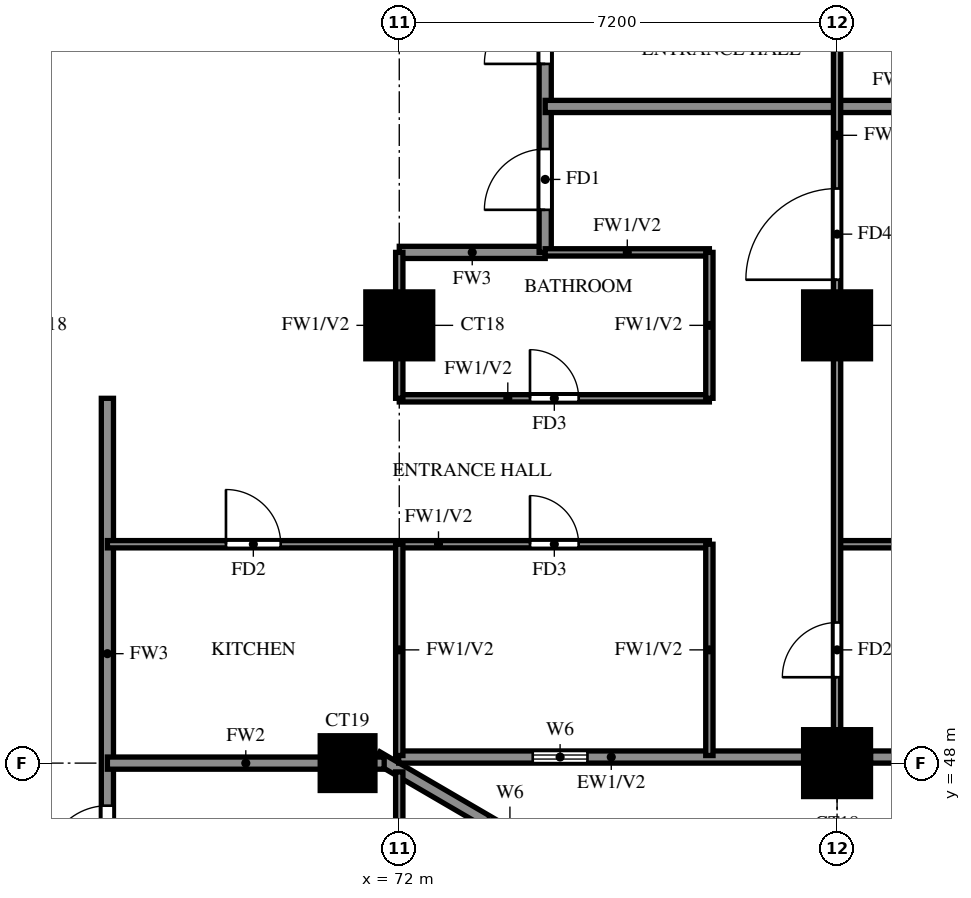
"""IFC4 building model, lengths in metres.
Left out: names, types, materials, properties, quantities, classifications, styles, units other than length and angle.
Written with IfcOpenShell. Run it as: python <this file> out.ifc"""

import sys

from ifc_helpers import new_model, si_unit, direction, frame, frame_2d, origin, origin_2d, place, context, subcontext, project, spatial, rectangle, extrude, source, transform, mapped, element, fill, save


model = new_model("IFC4")
c1 = context("Model", 3, precision=1e-05, world=origin(), true_north=direction((0.0, 1.0)))
c2 = subcontext(c1, "Body", "Model", "MODEL_VIEW")
j1 = project(units=[si_unit("LENGTHUNIT", "METRE"), si_unit("PLANEANGLEUNIT", "RADIAN")], contexts=[c1])
p1 = place(None, origin())
s1 = spatial("IfcSite", under=j1, at=p1, CompositionType="ELEMENT")
p2 = place(p1, origin())
s2 = spatial("IfcBuilding", under=s1, at=p2, CompositionType="ELEMENT")
p3 = place(p2, frame((0.0, 0.0, 116.5)))
s3 = spatial("IfcBuildingStorey", under=s2, at=p3, CompositionType="ELEMENT", Elevation=116.5)
m1 = source(origin(), c2, "Body", "SweptSolid", [
    extrude(rectangle(XDim=0.9, YDim=0.9, at=origin_2d()), origin(), (0.0, 0.0, 1.0), 3.2),
])
p4 = place(p3, frame((71.15, 48.0, 0.0), z_axis=(0.0, 0.0, 1.0), x_axis=(1.0, 0.0, 0.0)))
e1 = element("IfcColumn", 1, at=p4, inside=s3, PredefinedType="COLUMN", context=c2, shape_type="MappedRepresentation", body=[
    mapped(m1, transform((0.0, 0.0, 0.0))),
])
m2 = source(origin(), c2, "Body", "SweptSolid", [
    extrude(rectangle(XDim=1.1, YDim=1.1, at=origin_2d()), origin(), (0.0, 0.0, 1.0), 3.2),
])
for number, where, z_axis, x_axis in (
    (2, (79.2, 48.0, 0.0), (0.0, 0.0, 1.0), (1.0, 0.0, 0.0)),
    (3, (72.0, 55.2, 0.0), (0.0, 0.0, 1.0), (1.0, 0.0, 0.0)),
    (4, (79.2, 55.2, 0.0), (0.0, 0.0, 1.0), (1.0, 0.0, 0.0)),
):
    element("IfcColumn", number, at=place(p3, frame(where, z_axis=z_axis, x_axis=x_axis)), inside=s3, PredefinedType="COLUMN", context=c2, shape_type="MappedRepresentation", body=[
        mapped(m2, transform((0.0, 0.0, 0.0))),
    ])
p5 = place(p3, frame((85.719, 39.881, 0.0), z_axis=(0.0, 0.0, 1.0), x_axis=(-0.86377618652, 0.503875678716, 0.0)))
e5 = element("IfcWall", 5, at=p5, inside=s3, PredefinedType="SOLIDWALL", context=c2, shape_type="SweptSolid", body=[
    extrude(rectangle(XDim=16.311, YDim=0.2, at=frame_2d((8.156, 0.0))), origin(), (0.0, 0.0, 1.0), 3.2),
])
p6 = place(p5, frame((13.326, 0.0, 1.5)))
e6 = element("IfcOpeningElement", 6, at=p6, cuts=e5, PredefinedType="OPENING", context=c2, shape_type="SweptSolid", body=[
    extrude(rectangle(XDim=0.9, YDim=0.9, at=frame_2d((0.45, 0.45))), frame((0.0, 0.11, 0.0), z_axis=(0.0, -1.0, 0.0), x_axis=(1.0, 0.0, 0.0)), (0.0, 0.0, 1.0), 0.22),
])
p7 = place(p3, frame((71.99, 48.1, 0.0), z_axis=(0.0, 0.0, 1.0), x_axis=(1.0, 0.0, 0.0)))
e7 = element("IfcWall", 7, at=p7, inside=s3, PredefinedType="SOLIDWALL", context=c2, shape_type="SweptSolid", body=[
    extrude(rectangle(XDim=6.66, YDim=0.2, at=frame_2d((3.33, 0.0))), origin(), (0.0, 0.0, 1.0), 3.2),
])
p8 = place(p7, frame((2.205, 0.0, 1.5)))
e8 = element("IfcOpeningElement", 8, at=p8, cuts=e7, PredefinedType="OPENING", context=c2, shape_type="SweptSolid", body=[
    extrude(rectangle(XDim=0.9, YDim=0.9, at=frame_2d((0.45, 0.45))), frame((0.0, 0.11, 0.0), z_axis=(0.0, -1.0, 0.0), x_axis=(1.0, 0.0, 0.0)), (0.0, 0.0, 1.0), 0.22),
])
p9 = place(p3, frame((79.75, 48.1, 0.0), z_axis=(0.0, 0.0, 1.0), x_axis=(1.0, 0.0, 0.0)))
e9 = element("IfcWall", 9, at=p9, inside=s3, PredefinedType="SOLIDWALL", context=c2, shape_type="SweptSolid", body=[
    extrude(rectangle(XDim=5.6, YDim=0.2, at=frame_2d((2.8, 0.0))), origin(), (0.0, 0.0, 1.0), 3.2),
])
p10 = place(p9, frame((1.6, 0.0, 0.6)))
e10 = element("IfcOpeningElement", 10, at=p10, cuts=e9, PredefinedType="OPENING", context=c2, shape_type="SweptSolid", body=[
    extrude(rectangle(XDim=2.4, YDim=2.4, at=frame_2d((1.2, 1.2))), frame((0.0, 0.11, 0.0), z_axis=(0.0, -1.0, 0.0), x_axis=(1.0, 0.0, 0.0)), (0.0, 0.0, 1.0), 0.22),
])
p11 = place(p3, frame((72.0, 56.4, 0.0), z_axis=(0.0, 0.0, 1.0), x_axis=(1.0, 0.0, 0.0)))
e11 = element("IfcWall", 11, at=p11, inside=s3, PredefinedType="SOLIDWALL", context=c2, shape_type="SweptSolid", body=[
    extrude(rectangle(XDim=2.4, YDim=0.2, at=frame_2d((1.2, 0.0))), origin(), (0.0, 0.0, 1.0), 3.2),
])
p12 = place(p3, frame((67.2, 45.6, 0.0), z_axis=(0.0, 0.0, 1.0), x_axis=(0.0, 1.0, 0.0)))
e12 = element("IfcWall", 12, at=p12, inside=s3, PredefinedType="SOLIDWALL", context=c2, shape_type="SweptSolid", body=[
    extrude(rectangle(XDim=8.4, YDim=0.2, at=frame_2d((4.2, 0.0))), origin(), (0.0, 0.0, 1.0), 3.2),
])
p13 = place(p12, frame((0.7, 0.0, 0.0)))
e13 = element("IfcOpeningElement", 13, at=p13, cuts=e12, PredefinedType="OPENING", context=c2, shape_type="SweptSolid", body=[
    extrude(rectangle(XDim=1.0, YDim=2.1, at=frame_2d((0.5, 1.05))), frame((0.0, 0.11, 0.0), z_axis=(0.0, -1.0, 0.0), x_axis=(1.0, 0.0, 0.0)), (0.0, 0.0, 1.0), 0.22),
])
p14 = place(p3, frame((74.4, 56.4, 0.0), z_axis=(0.0, 0.0, 1.0), x_axis=(0.0, 1.0, 0.0)))
e14 = element("IfcWall", 14, at=p14, inside=s3, PredefinedType="SOLIDWALL", context=c2, shape_type="SweptSolid", body=[
    extrude(rectangle(XDim=9.6, YDim=0.2, at=frame_2d((4.8, 0.0))), origin(), (0.0, 0.0, 1.0), 3.2),
])
p15 = place(p14, frame((0.7, 0.0, 0.0)))
e15 = element("IfcOpeningElement", 15, at=p15, cuts=e14, PredefinedType="OPENING", context=c2, shape_type="SweptSolid", body=[
    extrude(rectangle(XDim=1.0, YDim=2.1, at=frame_2d((0.5, 1.05))), frame((0.0, 0.11, 0.0), z_axis=(0.0, -1.0, 0.0), x_axis=(1.0, 0.0, 0.0)), (0.0, 0.0, 1.0), 0.22),
])
p16 = place(p14, frame((3.1, 0.0, 0.0)))
e16 = element("IfcOpeningElement", 16, at=p16, cuts=e14, PredefinedType="OPENING", context=c2, shape_type="SweptSolid", body=[
    extrude(rectangle(XDim=1.0, YDim=2.1, at=frame_2d((0.5, 1.05))), frame((0.0, 0.11, 0.0), z_axis=(0.0, -1.0, 0.0), x_axis=(1.0, 0.0, 0.0)), (0.0, 0.0, 1.0), 0.22),
])
p17 = place(p3, frame((67.2, 48.0, 0.0), z_axis=(0.0, 0.0, 1.0), x_axis=(1.0, 0.0, 0.0)))
e17 = element("IfcWall", 17, at=p17, inside=s3, PredefinedType="SOLIDWALL", context=c2, shape_type="SweptSolid", body=[
    extrude(rectangle(XDim=4.552, YDim=0.2, at=frame_2d((2.276, 0.0))), origin(), (0.0, 0.0, 1.0), 3.2),
])
p18 = place(p3, frame((74.4, 58.8, 0.0), z_axis=(0.0, 0.0, 1.0), x_axis=(1.0, 0.0, 0.0)))
e18 = element("IfcWall", 18, at=p18, inside=s3, PredefinedType="SOLIDWALL", context=c2, shape_type="SweptSolid", body=[
    extrude(rectangle(XDim=11.875, YDim=0.2, at=frame_2d((5.938, 0.0))), origin(), (0.0, 0.0, 1.0), 2.3),
])
p19 = place(p3, frame((67.2, 51.6, 0.0), z_axis=(0.0, 0.0, 1.0), x_axis=(1.0, 0.0, 0.0)))
e19 = element("IfcWall", 19, at=p19, inside=s3, PredefinedType="PARTITIONING", context=c2, shape_type="SweptSolid", body=[
    extrude(rectangle(XDim=9.9, YDim=0.12, at=frame_2d((4.95, 0.0))), origin(), (0.0, 0.0, 1.0), 3.2),
])
p20 = place(p19, frame((6.95, 0.0, 0.0)))
e20 = element("IfcOpeningElement", 20, at=p20, cuts=e19, PredefinedType="OPENING", context=c2, shape_type="SweptSolid", body=[
    extrude(rectangle(XDim=0.8, YDim=2.1, at=frame_2d((0.4, 1.05))), frame((0.0, 0.07, 0.0), z_axis=(0.0, -1.0, 0.0), x_axis=(1.0, 0.0, 0.0)), (0.0, 0.0, 1.0), 0.14),
])
p21 = place(p19, frame((1.95, 0.0, 0.0)))
e21 = element("IfcOpeningElement", 21, at=p21, cuts=e19, PredefinedType="OPENING", context=c2, shape_type="SweptSolid", body=[
    extrude(rectangle(XDim=0.9, YDim=2.1, at=frame_2d((0.45, 1.05))), frame((0.0, 0.07, 0.0), z_axis=(0.0, -1.0, 0.0), x_axis=(1.0, 0.0, 0.0)), (0.0, 0.0, 1.0), 0.14),
])
p22 = place(p3, frame((79.2, 51.6, 0.0), z_axis=(0.0, 0.0, 1.0), x_axis=(1.0, 0.0, 0.0)))
e22 = element("IfcWall", 22, at=p22, inside=s3, PredefinedType="PARTITIONING", context=c2, shape_type="SweptSolid", body=[
    extrude(rectangle(XDim=7.075, YDim=0.12, at=frame_2d((3.538, 0.0))), origin(), (0.0, 0.0, 1.0), 2.3),
])
p23 = place(p3, frame((72.0, 54.0, 0.0), z_axis=(0.0, 0.0, 1.0), x_axis=(1.0, 0.0, 0.0)))
e23 = element("IfcWall", 23, at=p23, inside=s3, PredefinedType="PARTITIONING", context=c2, shape_type="SweptSolid", body=[
    extrude(rectangle(XDim=5.1, YDim=0.12, at=frame_2d((2.55, 0.0))), origin(), (0.0, 0.0, 1.0), 3.2),
])
p24 = place(p23, frame((2.15, 0.0, 0.0)))
e24 = element("IfcOpeningElement", 24, at=p24, cuts=e23, PredefinedType="OPENING", context=c2, shape_type="SweptSolid", body=[
    extrude(rectangle(XDim=0.8, YDim=2.1, at=frame_2d((0.4, 1.05))), frame((0.0, 0.07, 0.0), z_axis=(0.0, -1.0, 0.0), x_axis=(1.0, 0.0, 0.0)), (0.0, 0.0, 1.0), 0.14),
])
p25 = place(p3, frame((74.4, 56.4, 0.0), z_axis=(0.0, 0.0, 1.0), x_axis=(1.0, 0.0, 0.0)))
e25 = element("IfcWall", 25, at=p25, inside=s3, PredefinedType="PARTITIONING", context=c2, shape_type="SweptSolid", body=[
    extrude(rectangle(XDim=2.7, YDim=0.12, at=frame_2d((1.35, 0.0))), origin(), (0.0, 0.0, 1.0), 3.2),
])
p26 = place(p3, frame((72.0, 39.725, 0.0), z_axis=(0.0, 0.0, 1.0), x_axis=(0.0, 1.0, 0.0)))
e26 = element("IfcWall", 26, at=p26, inside=s3, PredefinedType="PARTITIONING", context=c2, shape_type="SweptSolid", body=[
    extrude(rectangle(XDim=8.13, YDim=0.12, at=frame_2d((4.065, 0.0))), origin(), (0.0, 0.0, 1.0), 2.3),
])
p27 = place(p26, frame((1.788, 0.0, 0.0)))
e27 = element("IfcOpeningElement", 27, at=p27, cuts=e26, PredefinedType="OPENING", context=c2, shape_type="SweptSolid", body=[
    extrude(rectangle(XDim=0.9, YDim=2.1, at=frame_2d((0.45, 1.05))), frame((0.0, 0.07, 0.0), z_axis=(0.0, -1.0, 0.0), x_axis=(1.0, 0.0, 0.0)), (0.0, 0.0, 1.0), 0.14),
])
p28 = place(p26, frame((4.575, 0.0, 0.0)))
e28 = element("IfcOpeningElement", 28, at=p28, cuts=e26, PredefinedType="OPENING", context=c2, shape_type="SweptSolid", body=[
    extrude(rectangle(XDim=0.8, YDim=2.1, at=frame_2d((0.4, 1.05))), frame((0.0, 0.07, 0.0), z_axis=(0.0, -1.0, 0.0), x_axis=(1.0, 0.0, 0.0)), (0.0, 0.0, 1.0), 0.14),
])
p29 = place(p3, frame((72.0, 48.125, 0.0), z_axis=(0.0, 0.0, 1.0), x_axis=(0.0, 1.0, 0.0)))
e29 = element("IfcWall", 29, at=p29, inside=s3, PredefinedType="PARTITIONING", context=c2, shape_type="SweptSolid", body=[
    extrude(rectangle(XDim=3.475, YDim=0.12, at=frame_2d((1.738, 0.0))), origin(), (0.0, 0.0, 1.0), 3.2),
])
p30 = place(p3, frame((72.0, 54.0, 0.0), z_axis=(0.0, 0.0, 1.0), x_axis=(0.0, 1.0, 0.0)))
e30 = element("IfcWall", 30, at=p30, inside=s3, PredefinedType="PARTITIONING", context=c2, shape_type="SweptSolid", body=[
    extrude(rectangle(XDim=2.4, YDim=0.12, at=frame_2d((1.2, 0.0))), origin(), (0.0, 0.0, 1.0), 3.2),
])
p31 = place(p3, frame((77.1, 48.125, 0.0), z_axis=(0.0, 0.0, 1.0), x_axis=(0.0, 1.0, 0.0)))
e31 = element("IfcWall", 31, at=p31, inside=s3, PredefinedType="PARTITIONING", context=c2, shape_type="SweptSolid", body=[
    extrude(rectangle(XDim=3.475, YDim=0.12, at=frame_2d((1.738, 0.0))), origin(), (0.0, 0.0, 1.0), 3.2),
])
p32 = place(p3, frame((77.1, 54.0, 0.0), z_axis=(0.0, 0.0, 1.0), x_axis=(0.0, 1.0, 0.0)))
e32 = element("IfcWall", 32, at=p32, inside=s3, PredefinedType="PARTITIONING", context=c2, shape_type="SweptSolid", body=[
    extrude(rectangle(XDim=2.4, YDim=0.12, at=frame_2d((1.2, 0.0))), origin(), (0.0, 0.0, 1.0), 3.2),
])
p33 = place(p3, frame((79.2, 48.125, 0.0), z_axis=(0.0, 0.0, 1.0), x_axis=(0.0, 1.0, 0.0)))
e33 = element("IfcWall", 33, at=p33, inside=s3, PredefinedType="PARTITIONING", context=c2, shape_type="SweptSolid", body=[
    extrude(rectangle(XDim=21.475, YDim=0.12, at=frame_2d((10.738, 0.0))), origin(), (0.0, 0.0, 1.0), 3.2),
])
p34 = place(p33, frame((1.288, 0.0, 0.0)))
e34 = element("IfcOpeningElement", 34, at=p34, cuts=e33, PredefinedType="OPENING", context=c2, shape_type="SweptSolid", body=[
    extrude(rectangle(XDim=0.9, YDim=2.1, at=frame_2d((0.45, 1.05))), frame((0.0, 0.07, 0.0), z_axis=(0.0, -1.0, 0.0), x_axis=(1.0, 0.0, 0.0)), (0.0, 0.0, 1.0), 0.14),
])
p35 = place(p33, frame((7.825, 0.0, 0.0)))
e35 = element("IfcOpeningElement", 35, at=p35, cuts=e33, PredefinedType="OPENING", context=c2, shape_type="SweptSolid", body=[
    extrude(rectangle(XDim=1.5, YDim=2.1, at=frame_2d((0.75, 1.05))), frame((0.0, 0.07, 0.0), z_axis=(0.0, -1.0, 0.0), x_axis=(1.0, 0.0, 0.0)), (0.0, 0.0, 1.0), 0.14),
])
p36 = place(p33, frame((12.025, 0.0, 0.0)))
e36 = element("IfcOpeningElement", 36, at=p36, cuts=e33, PredefinedType="OPENING", context=c2, shape_type="SweptSolid", body=[
    extrude(rectangle(XDim=0.9, YDim=2.1, at=frame_2d((0.45, 1.05))), frame((0.0, 0.07, 0.0), z_axis=(0.0, -1.0, 0.0), x_axis=(1.0, 0.0, 0.0)), (0.0, 0.0, 1.0), 0.14),
])
p37 = place(p33, frame((17.425, 0.0, 0.0)))
e37 = element("IfcOpeningElement", 37, at=p37, cuts=e33, PredefinedType="OPENING", context=c2, shape_type="SweptSolid", body=[
    extrude(rectangle(XDim=0.9, YDim=2.1, at=frame_2d((0.45, 1.05))), frame((0.0, 0.07, 0.0), z_axis=(0.0, -1.0, 0.0), x_axis=(1.0, 0.0, 0.0)), (0.0, 0.0, 1.0), 0.14),
])
p38 = place(p8, origin())
e38 = element("IfcWindow", 38, at=p38, inside=s3, PartitioningType="SINGLE_PANEL", PredefinedType="WINDOW", context=c2, shape_type="SweptSolid", body=[
    extrude(rectangle(XDim=0.9, YDim=0.9, at=frame_2d((0.45, 0.45))), frame((0.0, 0.03, 0.0), z_axis=(0.0, -1.0, 0.0), x_axis=(1.0, 0.0, 0.0)), (0.0, 0.0, 1.0), 0.06),
])
fill(e8, e38)
p39 = place(p15, origin())
e39 = element("IfcDoor", 39, at=p39, inside=s3, OperationType="SINGLE_SWING_RIGHT", PredefinedType="DOOR", context=c2, shape_type="SweptSolid", body=[
    extrude(rectangle(XDim=1.0, YDim=2.1, at=frame_2d((0.5, 1.05))), frame((0.0, 0.025, 0.0), z_axis=(0.0, -1.0, 0.0), x_axis=(1.0, 0.0, 0.0)), (0.0, 0.0, 1.0), 0.05),
])
fill(e15, e39)
p40 = place(p34, origin())
e40 = element("IfcDoor", 40, at=p40, inside=s3, OperationType="SINGLE_SWING_LEFT", PredefinedType="DOOR", context=c2, shape_type="SweptSolid", body=[
    extrude(rectangle(XDim=0.9, YDim=2.1, at=frame_2d((0.45, 1.05))), frame((0.0, 0.025, 0.0), z_axis=(0.0, -1.0, 0.0), x_axis=(1.0, 0.0, 0.0)), (0.0, 0.0, 1.0), 0.05),
])
fill(e34, e40)
p41 = place(p35, origin())
e41 = element("IfcDoor", 41, at=p41, inside=s3, OperationType="SINGLE_SWING_RIGHT", PredefinedType="DOOR", context=c2, shape_type="SweptSolid", body=[
    extrude(rectangle(XDim=1.5, YDim=2.1, at=frame_2d((0.75, 1.05))), frame((0.0, 0.025, 0.0), z_axis=(0.0, -1.0, 0.0), x_axis=(1.0, 0.0, 0.0)), (0.0, 0.0, 1.0), 0.05),
])
fill(e35, e41)
p42 = place(p20, origin())
e42 = element("IfcDoor", 42, at=p42, inside=s3, OperationType="SINGLE_SWING_RIGHT", PredefinedType="DOOR", context=c2, shape_type="SweptSolid", body=[
    extrude(rectangle(XDim=0.8, YDim=2.1, at=frame_2d((0.4, 1.05))), frame((0.0, 0.025, 0.0), z_axis=(0.0, -1.0, 0.0), x_axis=(1.0, 0.0, 0.0)), (0.0, 0.0, 1.0), 0.05),
])
fill(e20, e42)
p43 = place(p24, origin())
e43 = element("IfcDoor", 43, at=p43, inside=s3, OperationType="SINGLE_SWING_LEFT", PredefinedType="DOOR", context=c2, shape_type="SweptSolid", body=[
    extrude(rectangle(XDim=0.8, YDim=2.1, at=frame_2d((0.4, 1.05))), frame((0.0, 0.025, 0.0), z_axis=(0.0, -1.0, 0.0), x_axis=(1.0, 0.0, 0.0)), (0.0, 0.0, 1.0), 0.05),
])
fill(e24, e43)
p44 = place(p21, origin())
e44 = element("IfcDoor", 44, at=p44, inside=s3, OperationType="SINGLE_SWING_LEFT", PredefinedType="DOOR", context=c2, shape_type="SweptSolid", body=[
    extrude(rectangle(XDim=0.9, YDim=2.1, at=frame_2d((0.45, 1.05))), frame((0.0, 0.025, 0.0), z_axis=(0.0, -1.0, 0.0), x_axis=(1.0, 0.0, 0.0)), (0.0, 0.0, 1.0), 0.05),
])
fill(e21, e44)
p45 = place(p16, origin())
e45 = element("IfcDoor", 45, at=p45, inside=s3, OperationType="SINGLE_SWING_LEFT", PredefinedType="DOOR", context=c2, shape_type="SweptSolid", body=[
    extrude(rectangle(XDim=1.0, YDim=2.1, at=frame_2d((0.5, 1.05))), frame((0.0, 0.025, 0.0), z_axis=(0.0, -1.0, 0.0), x_axis=(1.0, 0.0, 0.0)), (0.0, 0.0, 1.0), 0.05),
])
fill(e16, e45)
p46 = place(p13, origin())
e46 = element("IfcDoor", 46, at=p46, inside=s3, OperationType="SINGLE_SWING_RIGHT", PredefinedType="DOOR", context=c2, shape_type="SweptSolid", body=[
    extrude(rectangle(XDim=1.0, YDim=2.1, at=frame_2d((0.5, 1.05))), frame((0.0, 0.025, 0.0), z_axis=(0.0, -1.0, 0.0), x_axis=(1.0, 0.0, 0.0)), (0.0, 0.0, 1.0), 0.05),
])
fill(e13, e46)
save(model, sys.argv[1])
